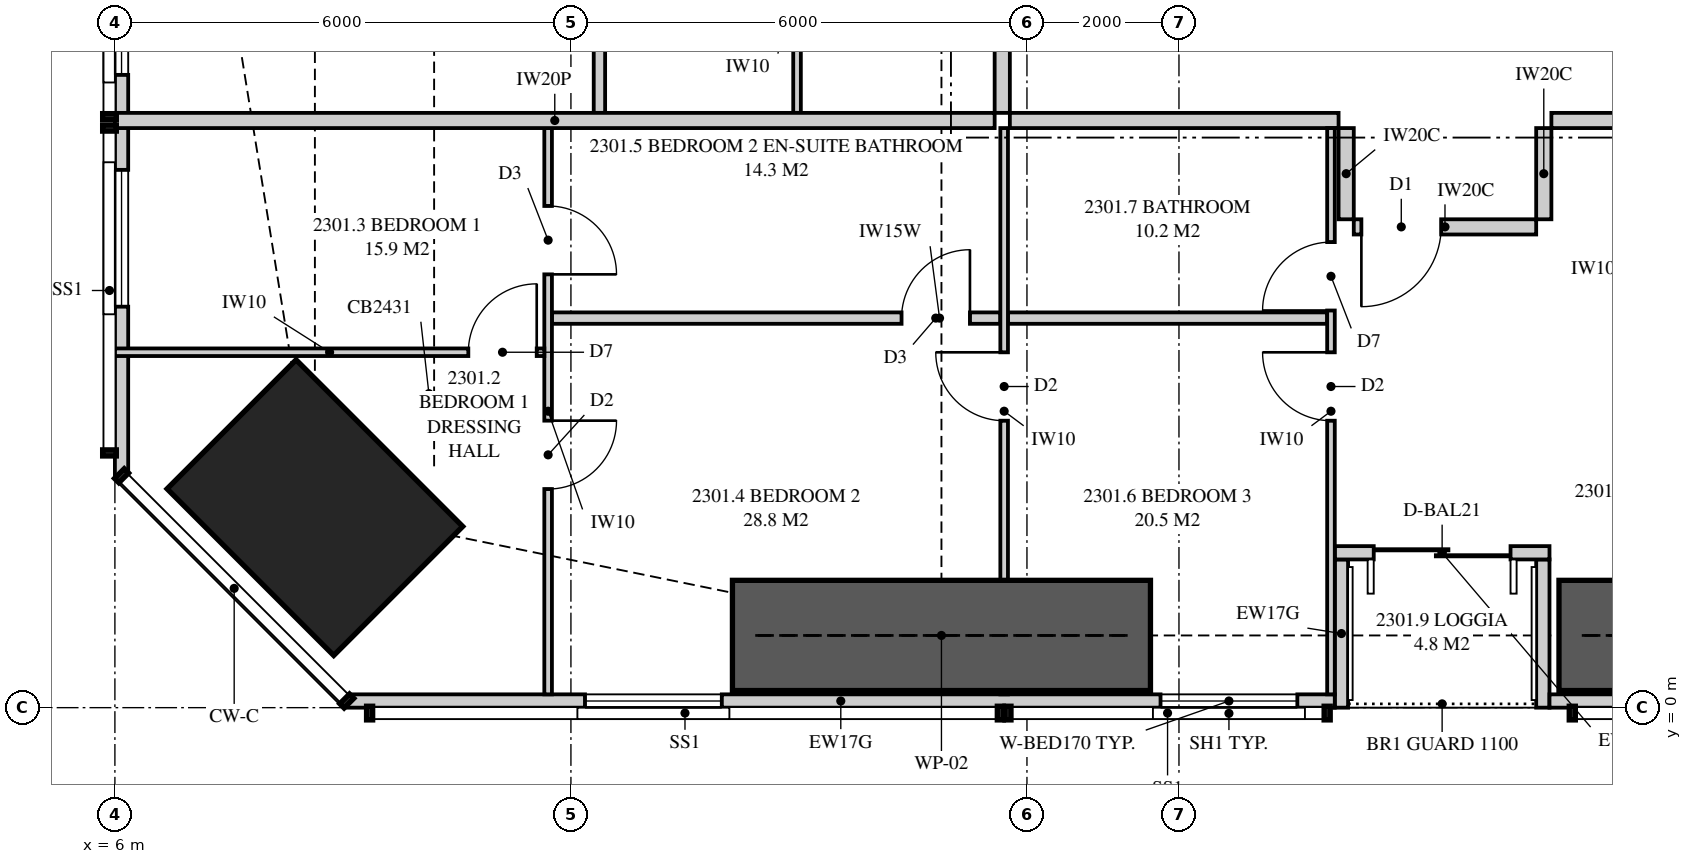
"""IFC4 building model, lengths in metres.
Left out: names, types, materials, properties, quantities, classifications, styles, units other than length and angle.
Written with IfcOpenShell. Run it as: python <this file> out.ifc"""

import sys

from ifc_helpers import new_model, si_unit, direction, frame, frame_2d, origin, origin_2d, place, context, subcontext, project, spatial, polyline, rectangle, hollow_rectangle, outline, extrude, element, fill, save


model = new_model("IFC4")
c1 = context("Model", 3, precision=1e-05, world=origin(), true_north=direction((0.0, 1.0)))
c2 = subcontext(c1, "Body", "Model", "MODEL_VIEW")
j1 = project(units=[si_unit("LENGTHUNIT", "METRE"), si_unit("PLANEANGLEUNIT", "RADIAN")], contexts=[c1])
p1 = place(None, origin())
s1 = spatial("IfcSite", under=j1, at=p1, CompositionType="ELEMENT")
p2 = place(p1, origin())
s2 = spatial("IfcBuilding", under=s1, at=p2, CompositionType="ELEMENT")
p3 = place(p2, frame((0.0, 0.0, 88.1)))
s3 = spatial("IfcBuildingStorey", under=s2, at=p3, CompositionType="ELEMENT", Elevation=88.1)
p4 = place(p3, frame((8.631, 2.631, 0.0), z_axis=(0.0, 0.0, 1.0), x_axis=(0.707106781187, 0.707106781187, 0.0)))
e1 = element("IfcColumn", 1, at=p4, inside=s3, PredefinedType="COLUMN", context=c2, shape_type="SweptSolid", body=[
    extrude(hollow_rectangle(XDim=2.4, YDim=3.1, WallThickness=0.125, at=origin_2d()), origin(), (0.0, 0.0, 1.0), 3.35),
])
p5 = place(p3, frame((9.051, 0.087, 0.0), z_axis=(0.0, 0.0, 1.0), x_axis=(1.0, 0.0, 0.0)))
e2 = element("IfcWall", 2, at=p5, inside=s3, PredefinedType="SOLIDWALL", context=c2, shape_type="SweptSolid", body=[
    extrude(outline(polyline([(0.0, 0.0), (12.999, 0.0), (12.999, 2.15), (7.824, 2.15), (7.824, 3.11), (7.666, 3.11), (7.666, 2.15), (7.62, 2.15), (7.62, 3.11), (0.0, 3.11), (0.0, 0.0)])), frame((0.0, 0.087, 0.0), z_axis=(0.0, -1.0, 0.0), x_axis=(1.0, 0.0, 0.0)), (0.0, 0.0, 1.0), 0.175),
])
p6 = place(p5, frame((3.134, 0.0, 0.4)))
e3 = element("IfcOpeningElement", 3, at=p6, cuts=e2, PredefinedType="OPENING", context=c2, shape_type="SweptSolid", body=[
    extrude(rectangle(XDim=1.8, YDim=1.7, at=frame_2d((0.9, 0.85))), frame((0.0, 0.097, 0.0), z_axis=(0.0, -1.0, 0.0), x_axis=(1.0, 0.0, 0.0)), (0.0, 0.0, 1.0), 0.195),
])
p7 = place(p5, frame((10.706, 0.0, 0.4)))
e4 = element("IfcOpeningElement", 4, at=p7, cuts=e2, PredefinedType="OPENING", context=c2, shape_type="SweptSolid", body=[
    extrude(rectangle(XDim=1.8, YDim=1.7, at=frame_2d((0.9, 0.85))), frame((0.0, 0.097, 0.0), z_axis=(0.0, -1.0, 0.0), x_axis=(1.0, 0.0, 0.0)), (0.0, 0.0, 1.0), 0.195),
])
p8 = place(p3, frame((24.875, 0.087, 0.0), z_axis=(0.0, 0.0, 1.0), x_axis=(1.0, 0.0, 0.0)))
e5 = element("IfcWall", 5, at=p8, inside=s3, PredefinedType="SOLIDWALL", context=c2, shape_type="SweptSolid", body=[
    extrude(rectangle(XDim=5.675, YDim=0.175, at=frame_2d((2.837, 0.0))), origin(), (0.0, 0.0, 1.0), 2.15),
])
p9 = place(p3, frame((22.05, 2.038, 0.0), z_axis=(0.0, 0.0, 1.0), x_axis=(1.0, 0.0, 0.0)))
e6 = element("IfcWall", 6, at=p9, inside=s3, PredefinedType="SOLIDWALL", context=c2, shape_type="SweptSolid", body=[
    extrude(rectangle(XDim=2.825, YDim=0.175, at=frame_2d((1.413, 0.0))), origin(), (0.0, 0.0, 1.0), 3.11),
])
p10 = place(p9, frame((0.512, 0.0, 0.0)))
e7 = element("IfcOpeningElement", 7, at=p10, cuts=e6, PredefinedType="OPENING", context=c2, shape_type="SweptSolid", body=[
    extrude(rectangle(XDim=1.8, YDim=2.1, at=frame_2d((0.9, 1.05))), frame((0.0, 0.097, 0.0), z_axis=(0.0, -1.0, 0.0), x_axis=(1.0, 0.0, 0.0)), (0.0, 0.0, 1.0), 0.195),
])
for number, where, z_axis, x_axis in (
    (8, (22.137, 0.0, 0.0), (0.0, 0.0, 1.0), (0.0, 1.0, 0.0)),
    (9, (24.788, 0.0, 0.0), (0.0, 0.0, 1.0), (0.0, 1.0, 0.0)),
):
    element("IfcWall", number, at=place(p3, frame(where, z_axis=z_axis, x_axis=x_axis)), inside=s3, PredefinedType="SOLIDWALL", context=c2, shape_type="SweptSolid", body=[
        extrude(outline(polyline([(0.0, 0.0), (1.95, 0.0), (1.95, 3.11), (1.75, 3.11), (1.75, 2.15), (0.15, 2.15), (0.15, 3.11), (0.0, 3.11), (0.0, 0.0)])), frame((0.0, 0.087, 0.0), z_axis=(0.0, -1.0, 0.0), x_axis=(1.0, 0.0, 0.0)), (0.0, 0.0, 1.0), 0.175),
    ])
p11 = place(p3, frame((6.087, 17.358, 0.0), z_axis=(0.0, 0.0, 1.0), x_axis=(0.0, -1.0, 0.0)))
e10 = element("IfcWall", 10, at=p11, inside=s3, PredefinedType="SOLIDWALL", context=c2, shape_type="SweptSolid", body=[
    extrude(outline(polyline([(0.0, 0.0), (14.307, 0.0), (14.307, 3.11), (4.577, 3.11), (4.577, 2.15), (4.484, 2.15), (4.484, 3.11), (4.358, 3.11), (4.358, 2.15), (0.0, 2.15), (0.0, 0.0)])), frame((0.0, 0.087, 0.0), z_axis=(0.0, -1.0, 0.0), x_axis=(1.0, 0.0, 0.0)), (0.0, 0.0, 1.0), 0.175),
])
p12 = place(p11, frame((0.3, 0.0, 0.4)))
e11 = element("IfcOpeningElement", 11, at=p12, cuts=e10, PredefinedType="OPENING", context=c2, shape_type="SweptSolid", body=[
    extrude(rectangle(XDim=1.2, YDim=1.7, at=frame_2d((0.6, 0.85))), frame((0.0, 0.097, 0.0), z_axis=(0.0, -1.0, 0.0), x_axis=(1.0, 0.0, 0.0)), (0.0, 0.0, 1.0), 0.195),
])
p13 = place(p11, frame((7.233, 0.0, 0.4)))
e12 = element("IfcOpeningElement", 12, at=p13, cuts=e10, PredefinedType="OPENING", context=c2, shape_type="SweptSolid", body=[
    extrude(rectangle(XDim=1.8, YDim=1.7, at=frame_2d((0.9, 0.85))), frame((0.0, 0.097, 0.0), z_axis=(0.0, -1.0, 0.0), x_axis=(1.0, 0.0, 0.0)), (0.0, 0.0, 1.0), 0.195),
])
p14 = place(p11, frame((10.283, 0.0, 0.4)))
e13 = element("IfcOpeningElement", 13, at=p14, cuts=e10, PredefinedType="OPENING", context=c2, shape_type="SweptSolid", body=[
    extrude(rectangle(XDim=1.8, YDim=1.7, at=frame_2d((0.9, 0.85))), frame((0.0, 0.097, 0.0), z_axis=(0.0, -1.0, 0.0), x_axis=(1.0, 0.0, 0.0)), (0.0, 0.0, 1.0), 0.195),
])
p15 = place(p3, frame((17.775, 7.725, 0.0), z_axis=(0.0, 0.0, 1.0), x_axis=(1.0, 0.0, 0.0)))
e14 = element("IfcWall", 14, at=p15, inside=s3, PredefinedType="PARTITIONING", context=c2, shape_type="SweptSolid", body=[
    extrude(rectangle(XDim=4.325, YDim=0.2, at=frame_2d((2.163, 0.0))), origin(), (0.0, 0.0, 1.0), 3.11),
])
p16 = place(p3, frame((11.7, 0.175, 0.0), z_axis=(0.0, 0.0, 1.0), x_axis=(0.0, 1.0, 0.0)))
e15 = element("IfcWall", 15, at=p16, inside=s3, PredefinedType="PARTITIONING", context=c2, shape_type="SweptSolid", body=[
    extrude(outline(polyline([(0.0, 0.0), (7.45, 0.0), (7.45, 3.11), (2.708, 3.11), (2.708, 2.15), (0.953, 2.15), (0.953, 3.11), (0.0, 3.11), (0.0, 0.0)])), frame((0.0, 0.05, 0.0), z_axis=(0.0, -1.0, 0.0), x_axis=(1.0, 0.0, 0.0)), (0.0, 0.0, 1.0), 0.1),
])
p17 = place(p16, frame((2.701, 0.0, 0.0)))
e16 = element("IfcOpeningElement", 16, at=p17, cuts=e15, PredefinedType="OPENING", context=c2, shape_type="SweptSolid", body=[
    extrude(rectangle(XDim=0.9, YDim=2.1, at=frame_2d((0.45, 1.05))), frame((0.0, 0.06, 0.0), z_axis=(0.0, -1.0, 0.0), x_axis=(1.0, 0.0, 0.0)), (0.0, 0.0, 1.0), 0.12),
])
p18 = place(p16, frame((5.525, 0.0, 0.0)))
e17 = element("IfcOpeningElement", 17, at=p18, cuts=e15, PredefinedType="OPENING", context=c2, shape_type="SweptSolid", body=[
    extrude(rectangle(XDim=0.9, YDim=2.1, at=frame_2d((0.45, 1.05))), frame((0.0, 0.06, 0.0), z_axis=(0.0, -1.0, 0.0), x_axis=(1.0, 0.0, 0.0)), (0.0, 0.0, 1.0), 0.12),
])
p19 = place(p3, frame((17.7, 0.175, 0.0), z_axis=(0.0, 0.0, 1.0), x_axis=(0.0, 1.0, 0.0)))
e18 = element("IfcWall", 18, at=p19, inside=s3, PredefinedType="PARTITIONING", context=c2, shape_type="SweptSolid", body=[
    extrude(outline(polyline([(1.635, 2.15), (0.0, 2.15), (0.0, 0.0), (7.45, 0.0), (7.45, 3.11), (1.635, 3.11), (1.635, 2.15)]), holes=[polyline([(1.024, 0.104), (0.526, 0.104), (0.526, 0.918), (1.024, 0.918), (1.024, 0.104)]), polyline([(1.024, 1.232), (0.526, 1.232), (0.526, 2.046), (1.024, 2.046), (1.024, 1.232)])]), frame((0.0, 0.05, 0.0), z_axis=(0.0, -1.0, 0.0), x_axis=(1.0, 0.0, 0.0)), (0.0, 0.0, 1.0), 0.1),
])
p20 = place(p19, frame((3.6, 0.0, 0.0)))
e19 = element("IfcOpeningElement", 19, at=p20, cuts=e18, PredefinedType="OPENING", context=c2, shape_type="SweptSolid", body=[
    extrude(rectangle(XDim=0.9, YDim=2.1, at=frame_2d((0.45, 1.05))), frame((0.0, 0.06, 0.0), z_axis=(0.0, -1.0, 0.0), x_axis=(1.0, 0.0, 0.0)), (0.0, 0.0, 1.0), 0.12),
])
p21 = place(p3, frame((22.0, 0.175, 0.0), z_axis=(0.0, 0.0, 1.0), x_axis=(0.0, 1.0, 0.0)))
e20 = element("IfcWall", 20, at=p21, inside=s3, PredefinedType="PARTITIONING", context=c2, shape_type="SweptSolid", body=[
    extrude(outline(polyline([(0.0, 0.0), (7.45, 0.0), (7.45, 3.11), (1.635, 3.11), (1.635, 2.15), (0.0, 2.15), (0.0, 3.11), (0.0, 0.0)])), frame((0.0, 0.05, 0.0), z_axis=(0.0, -1.0, 0.0), x_axis=(1.0, 0.0, 0.0)), (0.0, 0.0, 1.0), 0.1),
])
p22 = place(p21, frame((3.6, 0.0, 0.0)))
e21 = element("IfcOpeningElement", 21, at=p22, cuts=e20, PredefinedType="OPENING", context=c2, shape_type="SweptSolid", body=[
    extrude(rectangle(XDim=0.9, YDim=2.1, at=frame_2d((0.45, 1.05))), frame((0.0, 0.06, 0.0), z_axis=(0.0, -1.0, 0.0), x_axis=(1.0, 0.0, 0.0)), (0.0, 0.0, 1.0), 0.12),
])
p23 = place(p21, frame((5.05, 0.0, 0.0)))
e22 = element("IfcOpeningElement", 22, at=p23, cuts=e20, PredefinedType="OPENING", context=c2, shape_type="SweptSolid", body=[
    extrude(rectangle(XDim=0.9, YDim=2.1, at=frame_2d((0.45, 1.05))), frame((0.0, 0.06, 0.0), z_axis=(0.0, -1.0, 0.0), x_axis=(1.0, 0.0, 0.0)), (0.0, 0.0, 1.0), 0.12),
])
p24 = place(p3, frame((6.0, 4.676, 0.0), z_axis=(0.0, 0.0, 1.0), x_axis=(1.0, 0.0, 0.0)))
e23 = element("IfcWall", 23, at=p24, inside=s3, PredefinedType="PARTITIONING", context=c2, shape_type="SweptSolid", body=[
    extrude(outline(polyline([(0.0, 0.0), (5.65, 0.0), (5.65, 3.11), (5.46, 3.11), (5.46, 2.51), (3.171, 2.51), (3.171, 2.15), (1.429, 2.15), (1.429, 3.11), (0.0, 3.11), (0.0, 0.0)])), frame((0.0, 0.05, 0.0), z_axis=(0.0, -1.0, 0.0), x_axis=(1.0, 0.0, 0.0)), (0.0, 0.0, 1.0), 0.1),
])
p25 = place(p24, frame((4.65, 0.0, 0.0)))
e24 = element("IfcOpeningElement", 24, at=p25, cuts=e23, PredefinedType="OPENING", context=c2, shape_type="SweptSolid", body=[
    extrude(rectangle(XDim=0.9, YDim=2.1, at=frame_2d((0.45, 1.05))), frame((0.0, 0.06, 0.0), z_axis=(0.0, -1.0, 0.0), x_axis=(1.0, 0.0, 0.0)), (0.0, 0.0, 1.0), 0.12),
])
p26 = place(p3, frame((11.75, 5.125, 0.0), z_axis=(0.0, 0.0, 1.0), x_axis=(1.0, 0.0, 0.0)))
e25 = element("IfcWall", 25, at=p26, inside=s3, PredefinedType="PLUMBINGWALL", context=c2, shape_type="SweptSolid", body=[
    extrude(outline(polyline([(0.0, 0.0), (5.9, 0.0), (5.9, 3.11), (5.446, 3.11), (5.446, 2.531), (4.804, 2.531), (4.804, 3.11), (0.0, 3.11), (0.0, 0.0)])), frame((0.0, 0.075, 0.0), z_axis=(0.0, -1.0, 0.0), x_axis=(1.0, 0.0, 0.0)), (0.0, 0.0, 1.0), 0.15),
])
p27 = place(p26, frame((4.6, 0.0, 0.0)))
e26 = element("IfcOpeningElement", 26, at=p27, cuts=e25, PredefinedType="OPENING", context=c2, shape_type="SweptSolid", body=[
    extrude(rectangle(XDim=0.9, YDim=2.1, at=frame_2d((0.45, 1.05))), frame((0.0, 0.085, 0.0), z_axis=(0.0, -1.0, 0.0), x_axis=(1.0, 0.0, 0.0)), (0.0, 0.0, 1.0), 0.17),
])
p28 = place(p3, frame((17.75, 5.125, 0.0), z_axis=(0.0, 0.0, 1.0), x_axis=(1.0, 0.0, 0.0)))
e27 = element("IfcWall", 27, at=p28, inside=s3, PredefinedType="PLUMBINGWALL", context=c2, shape_type="SweptSolid", body=[
    extrude(rectangle(XDim=4.2, YDim=0.15, at=frame_2d((2.1, 0.0))), origin(), (0.0, 0.0, 1.0), 3.11),
])
p29 = place(p3, frame((6.0, 7.725, 0.0), z_axis=(0.0, 0.0, 1.0), x_axis=(1.0, 0.0, 0.0)))
e28 = element("IfcWall", 28, at=p29, inside=s3, PredefinedType="PARTITIONING", context=c2, shape_type="SweptSolid", body=[
    extrude(outline(polyline([(0.0, 0.0), (11.575, 0.0), (11.575, 3.11), (11.221, 3.11), (11.221, 2.531), (10.529, 2.531), (10.529, 3.11), (5.51, 3.11), (5.51, 2.51), (2.978, 2.51), (2.978, 2.531), (2.727, 2.531), (2.727, 2.15), (0.884, 2.15), (0.884, 3.11), (0.0, 3.11), (0.0, 0.0)])), frame((0.0, 0.1, 0.0), z_axis=(0.0, -1.0, 0.0), x_axis=(1.0, 0.0, 0.0)), (0.0, 0.0, 1.0), 0.2),
])
p30 = place(p3, frame((17.675, 7.825, 0.0), z_axis=(0.0, 0.0, 1.0), x_axis=(0.0, 1.0, 0.0)))
e29 = element("IfcWall", 29, at=p30, inside=s3, PredefinedType="PARTITIONING", context=c2, shape_type="SweptSolid", body=[
    extrude(outline(polyline([(0.0, 0.0), (9.075, 0.0), (9.075, 3.11), (3.096, 3.11), (3.096, 2.531), (2.404, 2.531), (2.404, 3.11), (0.0, 3.11), (0.0, 0.0)])), frame((0.0, 0.1, 0.0), z_axis=(0.0, -1.0, 0.0), x_axis=(1.0, 0.0, 0.0)), (0.0, 0.0, 1.0), 0.2),
])
p31 = place(p3, frame((12.375, 7.825, 0.0), z_axis=(0.0, 0.0, 1.0), x_axis=(0.0, 1.0, 0.0)))
e30 = element("IfcWall", 30, at=p31, inside=s3, PredefinedType="PLUMBINGWALL", context=c2, shape_type="SweptSolid", body=[
    extrude(outline(polyline([(0.0, 0.0), (3.45, 0.0), (3.45, 3.11), (3.071, 3.11), (3.071, 2.531), (2.429, 2.531), (2.429, 3.11), (0.0, 3.11), (0.0, 0.0)])), frame((0.0, 0.075, 0.0), z_axis=(0.0, -1.0, 0.0), x_axis=(1.0, 0.0, 0.0)), (0.0, 0.0, 1.0), 0.15),
])
p32 = place(p3, frame((14.975, 7.825, 0.0), z_axis=(0.0, 0.0, 1.0), x_axis=(0.0, 1.0, 0.0)))
e31 = element("IfcWall", 31, at=p32, inside=s3, PredefinedType="PARTITIONING", context=c2, shape_type="SweptSolid", body=[
    extrude(outline(polyline([(0.0, 0.0), (3.45, 0.0), (3.45, 3.11), (3.046, 3.11), (3.046, 2.531), (2.454, 2.531), (2.454, 3.11), (0.0, 3.11), (0.0, 0.0)])), frame((0.0, 0.05, 0.0), z_axis=(0.0, -1.0, 0.0), x_axis=(1.0, 0.0, 0.0)), (0.0, 0.0, 1.0), 0.1),
])
p33 = place(p3, frame((24.9, 7.725, 0.0), z_axis=(0.0, 0.0, 1.0), x_axis=(1.0, 0.0, 0.0)))
e32 = element("IfcWall", 32, at=p33, inside=s3, PredefinedType="PARTITIONING", context=c2, shape_type="SweptSolid", body=[
    extrude(outline(polyline([(0.0, 0.0), (4.8, 0.0), (4.8, 3.11), (3.196, 3.11), (3.196, 2.531), (2.504, 2.531), (2.504, 3.11), (0.0, 3.11), (0.0, 0.0)])), frame((0.0, 0.1, 0.0), z_axis=(0.0, -1.0, 0.0), x_axis=(1.0, 0.0, 0.0)), (0.0, 0.0, 1.0), 0.2),
])
p34 = place(p3, frame((22.3, 6.325, 0.0), z_axis=(0.0, 0.0, 1.0), x_axis=(1.0, 0.0, 0.0)))
e33 = element("IfcWall", 33, at=p34, inside=s3, PredefinedType="PARTITIONING", context=c2, shape_type="SweptSolid", body=[
    extrude(rectangle(XDim=2.4, YDim=0.2, at=frame_2d((1.2, 0.0))), origin(), (0.0, 0.0, 1.0), 3.11),
])
p35 = place(p34, frame((0.1, 0.0, 0.0)))
e34 = element("IfcOpeningElement", 34, at=p35, cuts=e33, PredefinedType="OPENING", context=c2, shape_type="SweptSolid", body=[
    extrude(rectangle(XDim=1.05, YDim=2.2, at=frame_2d((0.525, 1.1))), frame((0.0, 0.11, 0.0), z_axis=(0.0, -1.0, 0.0), x_axis=(1.0, 0.0, 0.0)), (0.0, 0.0, 1.0), 0.22),
])
for number, where, z_axis, x_axis in (
    (35, (22.2, 7.625, 0.0), (0.0, 0.0, 1.0), (0.0, -1.0, 0.0)),
    (36, (24.8, 7.625, 0.0), (0.0, 0.0, 1.0), (0.0, -1.0, 0.0)),
):
    element("IfcWall", number, at=place(p3, frame(where, z_axis=z_axis, x_axis=x_axis)), inside=s3, PredefinedType="PARTITIONING", context=c2, shape_type="SweptSolid", body=[
        extrude(rectangle(XDim=1.2, YDim=0.2, at=frame_2d((0.6, 0.0))), origin(), (0.0, 0.0, 1.0), 3.11),
    ])
for number, where, z_axis, x_axis in (
    (37, (14.125, 0.95, 0.0), (0.0, 0.0, 1.0), (1.0, 0.0, 0.0)),
    (38, (25.0, 0.95, 0.0), (0.0, 0.0, 1.0), (1.0, 0.0, 0.0)),
):
    element("IfcWall", number, at=place(p3, frame(where, z_axis=z_axis, x_axis=x_axis)), inside=s3, PredefinedType="SHEAR", context=c2, shape_type="SweptSolid", body=[
        extrude(rectangle(XDim=5.5, YDim=1.45, at=frame_2d((2.75, 0.0))), origin(), (0.0, 0.0, 1.0), 3.35),
    ])
p36 = place(p6, origin())
e39 = element("IfcWindow", 39, at=p36, inside=s3, PartitioningType="SINGLE_PANEL", PredefinedType="WINDOW", context=c2, shape_type="SweptSolid", body=[
    extrude(rectangle(XDim=1.8, YDim=1.7, at=frame_2d((0.9, 0.85))), frame((0.0, 0.03, 0.0), z_axis=(0.0, -1.0, 0.0), x_axis=(1.0, 0.0, 0.0)), (0.0, 0.0, 1.0), 0.06),
])
fill(e3, e39)
p37 = place(p7, origin())
e40 = element("IfcWindow", 40, at=p37, inside=s3, PartitioningType="SINGLE_PANEL", PredefinedType="WINDOW", context=c2, shape_type="SweptSolid", body=[
    extrude(rectangle(XDim=1.8, YDim=1.7, at=frame_2d((0.9, 0.85))), frame((0.0, 0.03, 0.0), z_axis=(0.0, -1.0, 0.0), x_axis=(1.0, 0.0, 0.0)), (0.0, 0.0, 1.0), 0.06),
])
fill(e4, e40)
p38 = place(p10, origin())
e41 = element("IfcDoor", 41, at=p38, inside=s3, OperationType="SLIDING_TO_LEFT", PredefinedType="DOOR", context=c2, shape_type="SweptSolid", body=[
    extrude(rectangle(XDim=1.8, YDim=2.1, at=frame_2d((0.9, 1.05))), frame((0.0, 0.025, 0.0), z_axis=(0.0, -1.0, 0.0), x_axis=(1.0, 0.0, 0.0)), (0.0, 0.0, 1.0), 0.05),
])
fill(e7, e41)
p39 = place(p13, origin())
e42 = element("IfcWindow", 42, at=p39, inside=s3, PartitioningType="SINGLE_PANEL", PredefinedType="WINDOW", context=c2, shape_type="SweptSolid", body=[
    extrude(rectangle(XDim=1.8, YDim=1.7, at=frame_2d((0.9, 0.85))), frame((0.0, 0.03, 0.0), z_axis=(0.0, -1.0, 0.0), x_axis=(1.0, 0.0, 0.0)), (0.0, 0.0, 1.0), 0.06),
])
fill(e12, e42)
p40 = place(p14, origin())
e43 = element("IfcWindow", 43, at=p40, inside=s3, PartitioningType="SINGLE_PANEL", PredefinedType="WINDOW", context=c2, shape_type="SweptSolid", body=[
    extrude(rectangle(XDim=1.8, YDim=1.7, at=frame_2d((0.9, 0.85))), frame((0.0, 0.03, 0.0), z_axis=(0.0, -1.0, 0.0), x_axis=(1.0, 0.0, 0.0)), (0.0, 0.0, 1.0), 0.06),
])
fill(e13, e43)
p41 = place(p35, frame((1.05, 0.0, 0.0), z_axis=(0.0, 0.0, 1.0), x_axis=(-1.0, 0.0, 0.0)))
e44 = element("IfcDoor", 44, at=p41, inside=s3, OperationType="SINGLE_SWING_RIGHT", PredefinedType="DOOR", context=c2, shape_type="SweptSolid", body=[
    extrude(rectangle(XDim=1.05, YDim=2.2, at=frame_2d((0.525, 1.1))), frame((0.0, 0.025, 0.0), z_axis=(0.0, -1.0, 0.0), x_axis=(1.0, 0.0, 0.0)), (0.0, 0.0, 1.0), 0.05),
])
fill(e34, e44)
p42 = place(p25, origin())
e45 = element("IfcDoor", 45, at=p42, inside=s3, OperationType="SINGLE_SWING_RIGHT", PredefinedType="DOOR", context=c2, shape_type="SweptSolid", body=[
    extrude(rectangle(XDim=0.9, YDim=2.1, at=frame_2d((0.45, 1.05))), frame((0.0, 0.025, 0.0), z_axis=(0.0, -1.0, 0.0), x_axis=(1.0, 0.0, 0.0)), (0.0, 0.0, 1.0), 0.05),
])
fill(e24, e45)
p43 = place(p17, frame((0.9, 0.0, 0.0), z_axis=(0.0, 0.0, 1.0), x_axis=(-1.0, 0.0, 0.0)))
e46 = element("IfcDoor", 46, at=p43, inside=s3, OperationType="SINGLE_SWING_LEFT", PredefinedType="DOOR", context=c2, shape_type="SweptSolid", body=[
    extrude(rectangle(XDim=0.9, YDim=2.1, at=frame_2d((0.45, 1.05))), frame((0.0, 0.025, 0.0), z_axis=(0.0, -1.0, 0.0), x_axis=(1.0, 0.0, 0.0)), (0.0, 0.0, 1.0), 0.05),
])
fill(e16, e46)
p44 = place(p20, origin())
e47 = element("IfcDoor", 47, at=p44, inside=s3, OperationType="SINGLE_SWING_RIGHT", PredefinedType="DOOR", context=c2, shape_type="SweptSolid", body=[
    extrude(rectangle(XDim=0.9, YDim=2.1, at=frame_2d((0.45, 1.05))), frame((0.0, 0.025, 0.0), z_axis=(0.0, -1.0, 0.0), x_axis=(1.0, 0.0, 0.0)), (0.0, 0.0, 1.0), 0.05),
])
fill(e19, e47)
p45 = place(p27, origin())
e48 = element("IfcDoor", 48, at=p45, inside=s3, OperationType="SINGLE_SWING_RIGHT", PredefinedType="DOOR", context=c2, shape_type="SweptSolid", body=[
    extrude(rectangle(XDim=0.9, YDim=2.1, at=frame_2d((0.45, 1.05))), frame((0.0, 0.025, 0.0), z_axis=(0.0, -1.0, 0.0), x_axis=(1.0, 0.0, 0.0)), (0.0, 0.0, 1.0), 0.05),
])
fill(e26, e48)
p46 = place(p22, origin())
e49 = element("IfcDoor", 49, at=p46, inside=s3, OperationType="SINGLE_SWING_RIGHT", PredefinedType="DOOR", context=c2, shape_type="SweptSolid", body=[
    extrude(rectangle(XDim=0.9, YDim=2.1, at=frame_2d((0.45, 1.05))), frame((0.0, 0.025, 0.0), z_axis=(0.0, -1.0, 0.0), x_axis=(1.0, 0.0, 0.0)), (0.0, 0.0, 1.0), 0.05),
])
fill(e21, e49)
p47 = place(p23, origin())
e50 = element("IfcDoor", 50, at=p47, inside=s3, OperationType="SINGLE_SWING_LEFT", PredefinedType="DOOR", context=c2, shape_type="SweptSolid", body=[
    extrude(rectangle(XDim=0.9, YDim=2.1, at=frame_2d((0.45, 1.05))), frame((0.0, 0.025, 0.0), z_axis=(0.0, -1.0, 0.0), x_axis=(1.0, 0.0, 0.0)), (0.0, 0.0, 1.0), 0.05),
])
fill(e22, e50)
p48 = place(p18, frame((0.9, 0.0, 0.0), z_axis=(0.0, 0.0, 1.0), x_axis=(-1.0, 0.0, 0.0)))
e51 = element("IfcDoor", 51, at=p48, inside=s3, OperationType="SINGLE_SWING_RIGHT", PredefinedType="DOOR", context=c2, shape_type="SweptSolid", body=[
    extrude(rectangle(XDim=0.9, YDim=2.1, at=frame_2d((0.45, 1.05))), frame((0.0, 0.025, 0.0), z_axis=(0.0, -1.0, 0.0), x_axis=(1.0, 0.0, 0.0)), (0.0, 0.0, 1.0), 0.05),
])
fill(e17, e51)
save(model, sys.argv[1])
